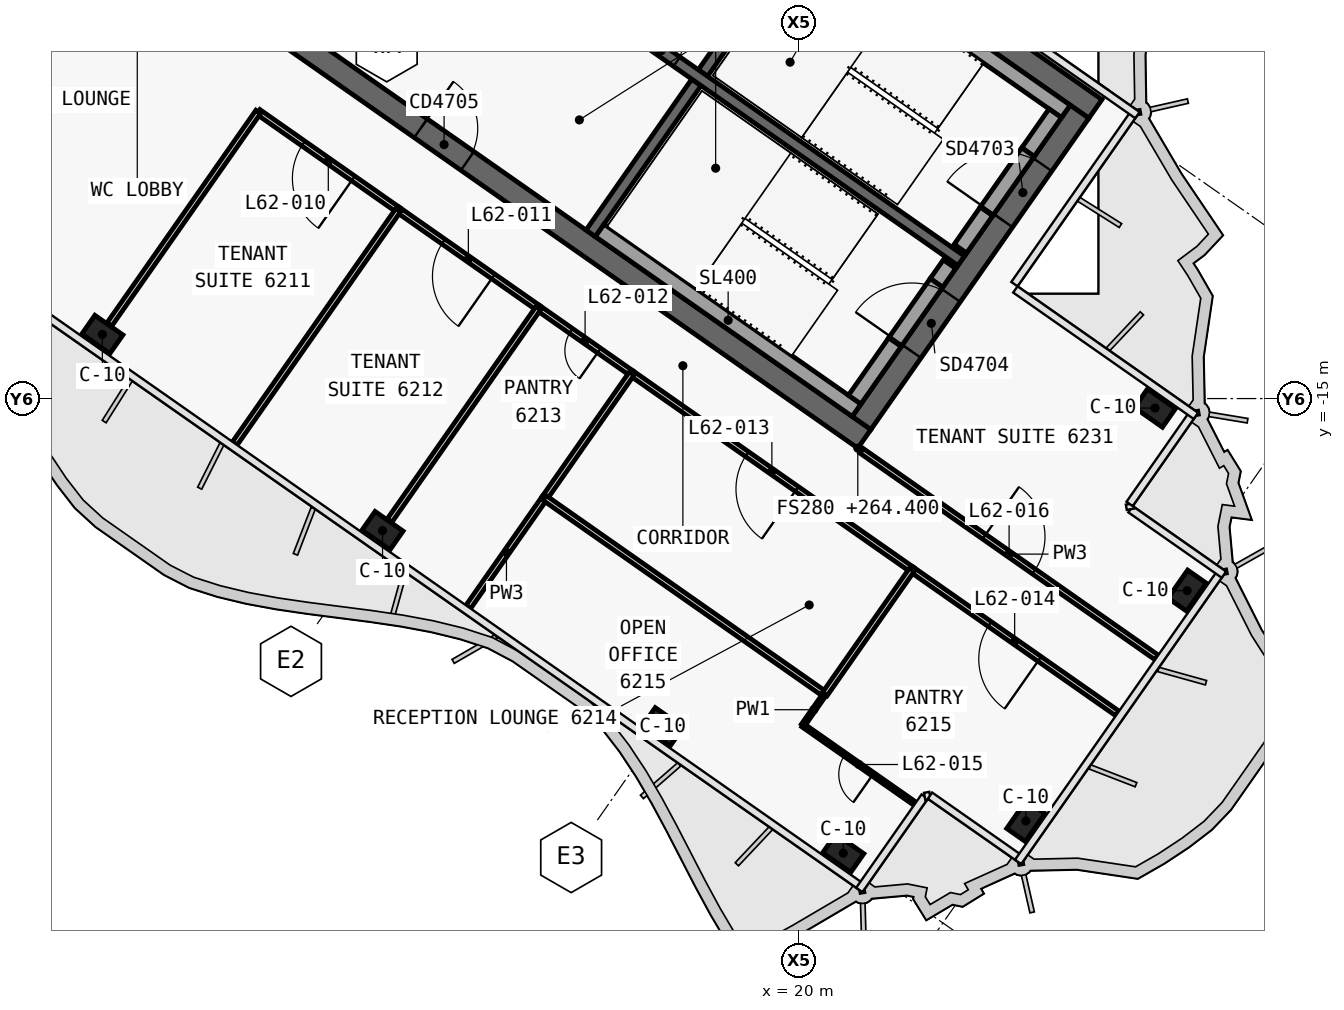
"""IFC4 building model, lengths in metres.
Left out: names, types, materials, properties, quantities, classifications, styles, units other than length and angle.
Written with IfcOpenShell. Run it as: python <this file> out.ifc"""

import sys

from ifc_helpers import new_model, si_unit, direction, frame, frame_2d, origin, origin_2d, place, context, subcontext, project, spatial, polyline, rectangle, outline, extrude, element, fill, save


model = new_model("IFC4")
c1 = context("Model", 3, precision=1e-05, world=origin(), true_north=direction((0.0, 1.0)))
c2 = subcontext(c1, "Body", "Model", "MODEL_VIEW")
j1 = project(units=[si_unit("LENGTHUNIT", "METRE"), si_unit("PLANEANGLEUNIT", "RADIAN")], contexts=[c1])
p1 = place(None, origin())
s1 = spatial("IfcSite", under=j1, at=p1, CompositionType="ELEMENT")
p2 = place(p1, origin())
s2 = spatial("IfcBuilding", under=s1, at=p2, CompositionType="ELEMENT")
p3 = place(p2, frame((0.0, 0.0, 264.4)))
s3 = spatial("IfcBuildingStorey", under=s2, at=p3, CompositionType="ELEMENT", Elevation=264.4)
p4 = place(p3, frame((0.028, 12.066, 0.0), z_axis=(0.0, 0.0, 1.0), x_axis=(0.819151382952, -0.573577380837, 0.0)))
e1 = element("IfcWall", 1, at=p4, inside=s3, PredefinedType="SHEAR", context=c2, shape_type="SweptSolid", body=[
    extrude(outline(polyline([(33.898, 0.3), (0.0, 0.3), (0.42, -0.3), (33.898, -0.3), (33.898, 0.3)])), origin(), (0.0, 0.0, 1.0), 3.9),
])
p5 = place(p3, frame((0.028, -0.874, 0.0), z_axis=(0.0, 0.0, 1.0), x_axis=(0.819150035022, -0.573579305871, 0.0)))
e2 = element("IfcWall", 2, at=p5, inside=s3, PredefinedType="SHEAR", context=c2, shape_type="SweptSolid", body=[
    extrude(outline(polyline([(26.476, 0.3), (0.0, 0.3), (0.42, -0.3), (26.476, -0.3), (26.476, 0.3)])), origin(), (0.0, 0.0, 1.0), 3.9),
])
p6 = place(p5, frame((6.576, 0.0, 0.0)))
e3 = element("IfcOpeningElement", 3, at=p6, cuts=e2, PredefinedType="OPENING", context=c2, shape_type="SweptSolid", body=[
    extrude(rectangle(XDim=1.5, YDim=2.1, at=frame_2d((0.75, 1.05))), frame((0.0, 0.31, 0.0), z_axis=(0.0, -1.0, 0.0), x_axis=(1.0, 0.0, 0.0)), (0.0, 0.0, 1.0), 0.62),
])
p7 = place(p5, frame((12.226, 0.0, 0.0)))
e4 = element("IfcOpeningElement", 4, at=p7, cuts=e2, PredefinedType="OPENING", context=c2, shape_type="SweptSolid", body=[
    extrude(rectangle(XDim=1.5, YDim=2.1, at=frame_2d((0.75, 1.05))), frame((0.0, 0.31, 0.0), z_axis=(0.0, -1.0, 0.0), x_axis=(1.0, 0.0, 0.0)), (0.0, 0.0, 1.0), 0.62),
])
p8 = place(p3, frame((21.642, -15.642, 0.0), z_axis=(0.0, 0.0, 1.0), x_axis=(0.573586866468, 0.819144740944, 0.0)))
e5 = element("IfcWall", 5, at=p8, inside=s3, PredefinedType="SHEAR", context=c2, shape_type="SweptSolid", body=[
    extrude(outline(polyline([(10.0, 0.3), (0.0, 0.3), (0.0, -0.3), (10.0, -0.3), (10.0, 0.3)])), origin(), (0.0, 0.0, 1.0), 3.9),
])
p9 = place(p8, frame((6.5, 0.0, 0.0)))
e6 = element("IfcOpeningElement", 6, at=p9, cuts=e5, PredefinedType="OPENING", context=c2, shape_type="SweptSolid", body=[
    extrude(rectangle(XDim=1.8, YDim=2.1, at=frame_2d((0.9, 1.05))), frame((0.0, 0.31, 0.0), z_axis=(0.0, -1.0, 0.0), x_axis=(1.0, 0.0, 0.0)), (0.0, 0.0, 1.0), 0.62),
])
p10 = place(p8, frame((2.3, 0.0, 0.0)))
e7 = element("IfcOpeningElement", 7, at=p10, cuts=e5, PredefinedType="OPENING", context=c2, shape_type="SweptSolid", body=[
    extrude(rectangle(XDim=1.8, YDim=2.1, at=frame_2d((0.9, 1.05))), frame((0.0, 0.31, 0.0), z_axis=(0.0, -1.0, 0.0), x_axis=(1.0, 0.0, 0.0)), (0.0, 0.0, 1.0), 0.62),
])
p11 = place(p3, frame((14.515, -10.652, 0.0), z_axis=(0.0, 0.0, 1.0), x_axis=(0.573560315113, 0.819163332265, 0.0)))
e8 = element("IfcWall", 8, at=p11, inside=s3, PredefinedType="SHEAR", context=c2, shape_type="SweptSolid", body=[
    extrude(outline(polyline([(0.0, 0.15), (0.0, -0.15), (4.85, -0.15), (4.85, 0.15), (0.0, 0.15)])), origin(), (0.0, 0.0, 1.0), 3.9),
])
p12 = place(p3, frame((17.469, -6.433, 0.0), z_axis=(0.0, 0.0, 1.0), x_axis=(0.573594092424, 0.81913968109, 0.0)))
e9 = element("IfcWall", 9, at=p12, inside=s3, PredefinedType="SHEAR", context=c2, shape_type="SweptSolid", body=[
    extrude(outline(polyline([(4.85, -0.15), (4.85, 0.15), (0.0, 0.15), (0.0, -0.15), (4.85, -0.15)])), origin(), (0.0, 0.0, 1.0), 3.9),
])
p13 = place(p3, frame((2.638, 3.768, 0.0), z_axis=(0.0, 0.0, 1.0), x_axis=(0.819155014212, -0.573572194837, 0.0)))
e10 = element("IfcWall", 10, at=p13, inside=s3, PredefinedType="SHEAR", context=c2, shape_type="SweptSolid", body=[
    extrude(outline(polyline([(0.0, 0.15), (0.0, -0.15), (26.4, -0.15), (26.4, 0.15), (0.0, 0.15)])), origin(), (0.0, 0.0, 1.0), 3.9),
])
p14 = place(p13, frame((9.637, 0.0, 0.0)))
e11 = element("IfcOpeningElement", 11, at=p14, cuts=e10, PredefinedType="OPENING", context=c2, shape_type="SweptSolid", body=[
    extrude(rectangle(XDim=1.2, YDim=2.1, at=frame_2d((0.6, 1.05))), frame((0.0, 0.16, 0.0), z_axis=(0.0, -1.0, 0.0), x_axis=(1.0, 0.0, 0.0)), (0.0, 0.0, 1.0), 0.32),
])
p15 = place(p13, frame((11.812, 0.0, 0.0)))
e12 = element("IfcOpeningElement", 12, at=p15, cuts=e10, PredefinedType="OPENING", context=c2, shape_type="SweptSolid", body=[
    extrude(rectangle(XDim=1.2, YDim=2.1, at=frame_2d((0.6, 1.05))), frame((0.0, 0.16, 0.0), z_axis=(0.0, -1.0, 0.0), x_axis=(1.0, 0.0, 0.0)), (0.0, 0.0, 1.0), 0.32),
])
p16 = place(p13, frame((13.988, 0.0, 0.0)))
e13 = element("IfcOpeningElement", 13, at=p16, cuts=e10, PredefinedType="OPENING", context=c2, shape_type="SweptSolid", body=[
    extrude(rectangle(XDim=1.2, YDim=2.1, at=frame_2d((0.6, 1.05))), frame((0.0, 0.16, 0.0), z_axis=(0.0, -1.0, 0.0), x_axis=(1.0, 0.0, 0.0)), (0.0, 0.0, 1.0), 0.32),
])
p17 = place(p13, frame((16.262, 0.0, 0.0)))
e14 = element("IfcOpeningElement", 14, at=p17, cuts=e10, PredefinedType="OPENING", context=c2, shape_type="SweptSolid", body=[
    extrude(rectangle(XDim=1.0, YDim=2.1, at=frame_2d((0.5, 1.05))), frame((0.0, 0.16, 0.0), z_axis=(0.0, -1.0, 0.0), x_axis=(1.0, 0.0, 0.0)), (0.0, 0.0, 1.0), 0.32),
])
for number, where, z_axis, x_axis in (
    (15, (1.665, -13.313, 0.0), (0.0, 0.0, 1.0), (0.819, -0.574, 0.0)),
    (16, (9.038, -18.475, 0.0), (0.0, 0.0, 1.0), (0.819, -0.574, 0.0)),
    (17, (16.41, -23.637, 0.0), (0.0, 0.0, 1.0), (0.819, -0.574, 0.0)),
    (18, (21.161, -26.964, 0.0), (0.0, 0.0, 1.0), (0.819, -0.574, 0.0)),
    (19, (29.363, -15.25, 0.0), (0.0, 0.0, 1.0), (0.819, -0.574, 0.0)),
    (20, (25.966, -26.117, 0.0), (0.0, 0.0, 1.0), (0.574, 0.819, 0.0)),
    (21, (30.21, -20.055, 0.0), (0.0, 0.0, 1.0), (0.574, 0.819, 0.0)),
):
    element("IfcColumn", number, at=place(p3, frame(where, z_axis=z_axis, x_axis=x_axis)), inside=s3, PredefinedType="COLUMN", context=c2, shape_type="SweptSolid", body=[
        extrude(rectangle(XDim=0.9, YDim=0.6, at=origin_2d()), origin(), (0.0, 0.0, 1.0), 3.9),
    ])
p18 = place(p3, frame((20.259, -2.71, 0.0), z_axis=(0.0, 0.0, 1.0), x_axis=(0.81914849389, -0.573581506813, 0.0)))
e22 = element("IfcWall", 22, at=p18, inside=s3, PredefinedType="SOLIDWALL", context=c2, shape_type="SweptSolid", body=[
    extrude(rectangle(XDim=8.25, YDim=0.4, at=frame_2d((4.125, 0.0))), origin(), (0.0, 0.0, 1.0), 3.62),
])
p19 = place(p3, frame((24.244, -11.055, 0.0), z_axis=(0.0, 0.0, 1.0), x_axis=(0.573571582932, 0.819155442668, 0.0)))
e23 = element("IfcWall", 23, at=p19, inside=s3, PredefinedType="SOLIDWALL", context=c2, shape_type="SweptSolid", body=[
    extrude(rectangle(XDim=1.2, YDim=0.4, at=frame_2d((0.6, 0.0))), origin(), (0.0, 0.0, 1.0), 3.62),
])
p20 = place(p3, frame((26.022, -8.515, 0.0), z_axis=(0.0, 0.0, 1.0), x_axis=(0.573619628835, 0.819121798889, 0.0)))
e24 = element("IfcWall", 24, at=p20, inside=s3, PredefinedType="SOLIDWALL", context=c2, shape_type="SweptSolid", body=[
    extrude(rectangle(XDim=1.25, YDim=0.4, at=frame_2d((0.625, 0.0))), origin(), (0.0, 0.0, 1.0), 3.62),
])
p21 = place(p3, frame((24.932, -10.072, 2.15), z_axis=(0.0, 0.0, 1.0), x_axis=(0.573591692345, 0.819141361715, 0.0)))
e25 = element("IfcWall", 25, at=p21, inside=s3, PredefinedType="SOLIDWALL", context=c2, shape_type="SweptSolid", body=[
    extrude(rectangle(XDim=1.9, YDim=0.4, at=frame_2d((0.95, 0.0))), origin(), (0.0, 0.0, 1.0), 1.47),
])
p22 = place(p3, frame((14.753, -10.574, 0.0), z_axis=(0.0, 0.0, 1.0), x_axis=(0.819158229677, -0.573567602601, 0.0)))
e26 = element("IfcWall", 26, at=p22, inside=s3, PredefinedType="SOLIDWALL", context=c2, shape_type="SweptSolid", body=[
    extrude(rectangle(XDim=8.25, YDim=0.4, at=frame_2d((4.125, 0.0))), origin(), (0.0, 0.0, 1.0), 3.62),
])
p23 = place(p3, frame((21.462, -15.028, 0.0), z_axis=(0.0, 0.0, 1.0), x_axis=(0.573559770908, 0.819163713305, 0.0)))
e27 = element("IfcWall", 27, at=p23, inside=s3, PredefinedType="SOLIDWALL", context=c2, shape_type="SweptSolid", body=[
    extrude(rectangle(XDim=1.85, YDim=0.4, at=frame_2d((0.925, 0.0))), origin(), (0.0, 0.0, 1.0), 3.62),
])
p24 = place(p3, frame((23.613, -11.956, 0.0), z_axis=(0.0, 0.0, 1.0), x_axis=(0.573435029941, 0.819251039936, 0.0)))
e28 = element("IfcWall", 28, at=p24, inside=s3, PredefinedType="SOLIDWALL", context=c2, shape_type="SweptSolid", body=[
    extrude(rectangle(XDim=0.6, YDim=0.4, at=frame_2d((0.3, 0.0))), origin(), (0.0, 0.0, 1.0), 3.62),
])
p25 = place(p3, frame((22.523, -13.512, 2.15), z_axis=(0.0, 0.0, 1.0), x_axis=(0.573591692345, 0.819141361715, 0.0)))
e29 = element("IfcWall", 29, at=p25, inside=s3, PredefinedType="SOLIDWALL", context=c2, shape_type="SweptSolid", body=[
    extrude(rectangle(XDim=1.9, YDim=0.4, at=frame_2d((0.95, 0.0))), origin(), (0.0, 0.0, 1.0), 1.47),
])
p26 = place(p3, frame((21.642, -16.375, 0.0), z_axis=(0.0, 0.0, 1.0), x_axis=(0.819154480923, -0.573572956461, 0.0)))
e30 = element("IfcWall", 30, at=p26, inside=s3, PredefinedType="PARTITIONING", context=c2, shape_type="SweptSolid", body=[
    extrude(rectangle(XDim=9.48, YDim=0.15, at=frame_2d((4.74, 0.0))), origin(), (0.0, 0.0, 1.0), 3.0),
])
p27 = place(p26, frame((3.94, 0.0, 0.0)))
e31 = element("IfcOpeningElement", 31, at=p27, cuts=e30, PredefinedType="OPENING", context=c2, shape_type="SweptSolid", body=[
    extrude(rectangle(XDim=1.6, YDim=2.1, at=frame_2d((0.8, 1.05))), frame((0.0, 0.085, 0.0), z_axis=(0.0, -1.0, 0.0), x_axis=(1.0, 0.0, 0.0)), (0.0, 0.0, 1.0), 0.17),
])
p28 = place(p3, frame((9.454, -10.038, 0.0), z_axis=(0.0, 0.0, 1.0), x_axis=(-0.819142740634, 0.573589723117, 0.0)))
e32 = element("IfcWall", 32, at=p28, inside=s3, PredefinedType="PARTITIONING", context=c2, shape_type="SweptSolid", body=[
    extrude(rectangle(XDim=4.502, YDim=0.15, at=frame_2d((2.251, 0.0))), origin(), (0.0, 0.0, 1.0), 3.05),
])
p29 = place(p28, frame((1.451, 0.0, 0.0)))
e33 = element("IfcOpeningElement", 33, at=p29, cuts=e32, PredefinedType="OPENING", context=c2, shape_type="SweptSolid", body=[
    extrude(rectangle(XDim=1.6, YDim=2.1, at=frame_2d((0.8, 1.05))), frame((0.0, 0.085, 0.0), z_axis=(0.0, -1.0, 0.0), x_axis=(1.0, 0.0, 0.0)), (0.0, 0.0, 1.0), 0.17),
])
p30 = place(p3, frame((13.14, -12.619, 0.0), z_axis=(0.0, 0.0, 1.0), x_axis=(-0.819165703328, 0.573556928727, 0.0)))
e34 = element("IfcWall", 34, at=p30, inside=s3, PredefinedType="PARTITIONING", context=c2, shape_type="SweptSolid", body=[
    extrude(rectangle(XDim=4.504, YDim=0.15, at=frame_2d((2.252, 0.0))), origin(), (0.0, 0.0, 1.0), 3.05),
])
p31 = place(p30, frame((1.452, 0.0, 0.0)))
e35 = element("IfcOpeningElement", 35, at=p31, cuts=e34, PredefinedType="OPENING", context=c2, shape_type="SweptSolid", body=[
    extrude(rectangle(XDim=1.6, YDim=2.1, at=frame_2d((0.8, 1.05))), frame((0.0, 0.085, 0.0), z_axis=(0.0, -1.0, 0.0), x_axis=(1.0, 0.0, 0.0)), (0.0, 0.0, 1.0), 0.17),
])
p32 = place(p3, frame((15.598, -14.34, 0.0), z_axis=(0.0, 0.0, 1.0), x_axis=(-0.81916700466, 0.573555070134, 0.0)))
e36 = element("IfcWall", 36, at=p32, inside=s3, PredefinedType="PARTITIONING", context=c2, shape_type="SweptSolid", body=[
    extrude(rectangle(XDim=3.004, YDim=0.15, at=frame_2d((1.502, 0.0))), origin(), (0.0, 0.0, 1.0), 3.05),
])
p33 = place(p32, frame((1.052, 0.0, 0.0)))
e37 = element("IfcOpeningElement", 37, at=p33, cuts=e36, PredefinedType="OPENING", context=c2, shape_type="SweptSolid", body=[
    extrude(rectangle(XDim=0.9, YDim=2.1, at=frame_2d((0.45, 1.05))), frame((0.0, 0.085, 0.0), z_axis=(0.0, -1.0, 0.0), x_axis=(1.0, 0.0, 0.0)), (0.0, 0.0, 1.0), 0.17),
])
p34 = place(p3, frame((22.97, -19.502, 0.0), z_axis=(0.0, 0.0, 1.0), x_axis=(-0.819151661297, 0.57357698332, 0.0)))
e38 = element("IfcWall", 38, at=p34, inside=s3, PredefinedType="PARTITIONING", context=c2, shape_type="SweptSolid", body=[
    extrude(rectangle(XDim=9.004, YDim=0.15, at=frame_2d((4.502, 0.0))), origin(), (0.0, 0.0, 1.0), 3.05),
])
p35 = place(p34, frame((3.702, 0.0, 0.0)))
e39 = element("IfcOpeningElement", 39, at=p35, cuts=e38, PredefinedType="OPENING", context=c2, shape_type="SweptSolid", body=[
    extrude(rectangle(XDim=1.6, YDim=2.1, at=frame_2d((0.8, 1.05))), frame((0.0, 0.085, 0.0), z_axis=(0.0, -1.0, 0.0), x_axis=(1.0, 0.0, 0.0)), (0.0, 0.0, 1.0), 0.17),
])
p36 = place(p3, frame((28.375, -23.287, 0.0), z_axis=(0.0, 0.0, 1.0), x_axis=(-0.81915199888, 0.573576501202, 0.0)))
e40 = element("IfcWall", 40, at=p36, inside=s3, PredefinedType="PARTITIONING", context=c2, shape_type="SweptSolid", body=[
    extrude(rectangle(XDim=6.602, YDim=0.15, at=frame_2d((3.301, 0.0))), origin(), (0.0, 0.0, 1.0), 3.0),
])
p37 = place(p36, frame((2.501, 0.0, 0.0)))
e41 = element("IfcOpeningElement", 41, at=p37, cuts=e40, PredefinedType="OPENING", context=c2, shape_type="SweptSolid", body=[
    extrude(rectangle(XDim=1.6, YDim=2.1, at=frame_2d((0.8, 1.05))), frame((0.0, 0.085, 0.0), z_axis=(0.0, -1.0, 0.0), x_axis=(1.0, 0.0, 0.0)), (0.0, 0.0, 1.0), 0.17),
])
p38 = place(p3, frame((9.452, -10.037, 0.0), z_axis=(0.0, 0.0, 1.0), x_axis=(-0.573575945067, -0.81915238829, 0.0)))
e42 = element("IfcWall", 42, at=p38, inside=s3, PredefinedType="PARTITIONING", context=c2, shape_type="SweptSolid", body=[
    extrude(rectangle(XDim=7.5, YDim=0.15, at=frame_2d((3.75, 0.0))), origin(), (0.0, 0.0, 1.0), 3.0),
])
p39 = place(p3, frame((1.849, -13.051, 0.0), z_axis=(0.0, 0.0, 1.0), x_axis=(0.573577493031, 0.819151304393, 0.0)))
e43 = element("IfcWall", 43, at=p39, inside=s3, PredefinedType="PARTITIONING", context=c2, shape_type="SweptSolid", body=[
    extrude(rectangle(XDim=6.83, YDim=0.15, at=frame_2d((3.415, 0.0))), origin(), (0.0, 0.0, 1.0), 3.05),
])
p40 = place(p3, frame((13.139, -12.618, 0.0), z_axis=(0.0, 0.0, 1.0), x_axis=(-0.573560698343, -0.819163063936, 0.0)))
e44 = element("IfcWall", 44, at=p40, inside=s3, PredefinedType="PARTITIONING", context=c2, shape_type="SweptSolid", body=[
    extrude(rectangle(XDim=6.83, YDim=0.15, at=frame_2d((3.415, 0.0))), origin(), (0.0, 0.0, 1.0), 3.05),
])
p41 = place(p3, frame((15.596, -14.339, 0.0), z_axis=(0.0, 0.0, 1.0), x_axis=(-0.573560601885, -0.819163131473, 0.0)))
e45 = element("IfcWall", 45, at=p41, inside=s3, PredefinedType="PARTITIONING", context=c2, shape_type="SweptSolid", body=[
    extrude(rectangle(XDim=4.002, YDim=0.15, at=frame_2d((2.001, 0.0))), origin(), (0.0, 0.0, 1.0), 3.62),
])
p42 = place(p3, frame((13.302, -17.615, 0.0), z_axis=(0.0, 0.0, 1.0), x_axis=(-0.573560622794, -0.819163116834, 0.0)))
e46 = element("IfcWall", 46, at=p42, inside=s3, PredefinedType="PARTITIONING", context=c2, shape_type="SweptSolid", body=[
    extrude(rectangle(XDim=3.501, YDim=0.15, at=frame_2d((1.75, 0.0))), origin(), (0.0, 0.0, 1.0), 3.0),
])
p43 = place(p3, frame((20.674, -22.778, 0.0), z_axis=(0.0, 0.0, 1.0), x_axis=(-0.819141427692, 0.573591598124, 0.0)))
e47 = element("IfcWall", 47, at=p43, inside=s3, PredefinedType="PARTITIONING", context=c2, shape_type="SweptSolid", body=[
    extrude(rectangle(XDim=9.0, YDim=0.15, at=frame_2d((4.5, 0.0))), origin(), (0.0, 0.0, 1.0), 3.05),
])
p44 = place(p3, frame((22.969, -19.501, 0.0), z_axis=(0.0, 0.0, 1.0), x_axis=(-0.573556557423, -0.819165963305, 0.0)))
e48 = element("IfcWall", 48, at=p44, inside=s3, PredefinedType="PARTITIONING", context=c2, shape_type="SweptSolid", body=[
    extrude(rectangle(XDim=4.0, YDim=0.15, at=frame_2d((2.0, 0.0))), origin(), (0.0, 0.0, 1.0), 3.05),
])
p45 = place(p3, frame((20.1, -23.597, 0.0), z_axis=(0.0, 0.0, 1.0), x_axis=(0.573544276158, 0.819174562158, 0.0)))
e49 = element("IfcWall", 49, at=p45, inside=s3, PredefinedType="PARTITIONING", context=c2, shape_type="SweptSolid", body=[
    extrude(rectangle(XDim=1.0, YDim=0.1, at=frame_2d((0.5, 0.0))), origin(), (0.0, 0.0, 1.0), 3.62),
])
p46 = place(p3, frame((23.049, -25.662, 0.0), z_axis=(0.0, 0.0, 1.0), x_axis=(-0.81914589004, 0.573585225429, 0.0)))
e50 = element("IfcWall", 50, at=p46, inside=s3, PredefinedType="PARTITIONING", context=c2, shape_type="SweptSolid", body=[
    extrude(rectangle(XDim=3.6, YDim=0.1, at=frame_2d((1.8, 0.0))), origin(), (0.0, 0.0, 1.0), 3.05),
])
p47 = place(p46, frame((1.35, 0.0, 0.0)))
e51 = element("IfcOpeningElement", 51, at=p47, cuts=e50, PredefinedType="OPENING", context=c2, shape_type="SweptSolid", body=[
    extrude(rectangle(XDim=0.9, YDim=2.1, at=frame_2d((0.45, 1.05))), frame((0.0, 0.06, 0.0), z_axis=(0.0, -1.0, 0.0), x_axis=(1.0, 0.0, 0.0)), (0.0, 0.0, 1.0), 0.12),
])
p48 = place(p17, origin())
e52 = element("IfcDoor", 52, at=p48, inside=s3, OperationType="SINGLE_SWING_RIGHT", PredefinedType="DOOR", context=c2, shape_type="SweptSolid", body=[
    extrude(rectangle(XDim=1.0, YDim=2.1, at=frame_2d((0.5, 1.05))), frame((0.0, 0.025, 0.0), z_axis=(0.0, -1.0, 0.0), x_axis=(1.0, 0.0, 0.0)), (0.0, 0.0, 1.0), 0.05),
])
fill(e14, e52)
p49 = place(p7, origin())
e53 = element("IfcDoor", 53, at=p49, inside=s3, OperationType="DOUBLE_DOOR_SINGLE_SWING", PredefinedType="DOOR", context=c2, shape_type="SweptSolid", body=[
    extrude(rectangle(XDim=1.5, YDim=2.1, at=frame_2d((0.75, 1.05))), frame((0.0, 0.025, 0.0), z_axis=(0.0, -1.0, 0.0), x_axis=(1.0, 0.0, 0.0)), (0.0, 0.0, 1.0), 0.05),
])
fill(e4, e53)
p50 = place(p9, origin())
e54 = element("IfcDoor", 54, at=p50, inside=s3, OperationType="DOUBLE_DOOR_SINGLE_SWING", PredefinedType="DOOR", context=c2, shape_type="SweptSolid", body=[
    extrude(rectangle(XDim=1.8, YDim=2.1, at=frame_2d((0.9, 1.05))), frame((0.0, 0.025, 0.0), z_axis=(0.0, -1.0, 0.0), x_axis=(1.0, 0.0, 0.0)), (0.0, 0.0, 1.0), 0.05),
])
fill(e6, e54)
p51 = place(p10, origin())
e55 = element("IfcDoor", 55, at=p51, inside=s3, OperationType="DOUBLE_DOOR_SINGLE_SWING", PredefinedType="DOOR", context=c2, shape_type="SweptSolid", body=[
    extrude(rectangle(XDim=1.8, YDim=2.1, at=frame_2d((0.9, 1.05))), frame((0.0, 0.025, 0.0), z_axis=(0.0, -1.0, 0.0), x_axis=(1.0, 0.0, 0.0)), (0.0, 0.0, 1.0), 0.05),
])
fill(e7, e55)
p52 = place(p29, origin())
e56 = element("IfcDoor", 56, at=p52, inside=s3, OperationType="DOUBLE_DOOR_SINGLE_SWING", PredefinedType="DOOR", context=c2, shape_type="SweptSolid", body=[
    extrude(rectangle(XDim=1.6, YDim=2.1, at=frame_2d((0.8, 1.05))), frame((0.0, 0.025, 0.0), z_axis=(0.0, -1.0, 0.0), x_axis=(1.0, 0.0, 0.0)), (0.0, 0.0, 1.0), 0.05),
])
fill(e33, e56)
p53 = place(p31, origin())
e57 = element("IfcDoor", 57, at=p53, inside=s3, OperationType="DOUBLE_DOOR_SINGLE_SWING", PredefinedType="DOOR", context=c2, shape_type="SweptSolid", body=[
    extrude(rectangle(XDim=1.6, YDim=2.1, at=frame_2d((0.8, 1.05))), frame((0.0, 0.025, 0.0), z_axis=(0.0, -1.0, 0.0), x_axis=(1.0, 0.0, 0.0)), (0.0, 0.0, 1.0), 0.05),
])
fill(e35, e57)
p54 = place(p33, origin())
e58 = element("IfcDoor", 58, at=p54, inside=s3, OperationType="SINGLE_SWING_LEFT", PredefinedType="DOOR", context=c2, shape_type="SweptSolid", body=[
    extrude(rectangle(XDim=0.9, YDim=2.1, at=frame_2d((0.45, 1.05))), frame((0.0, 0.025, 0.0), z_axis=(0.0, -1.0, 0.0), x_axis=(1.0, 0.0, 0.0)), (0.0, 0.0, 1.0), 0.05),
])
fill(e37, e58)
p55 = place(p35, origin())
e59 = element("IfcDoor", 59, at=p55, inside=s3, OperationType="DOUBLE_DOOR_SINGLE_SWING", PredefinedType="DOOR", context=c2, shape_type="SweptSolid", body=[
    extrude(rectangle(XDim=1.6, YDim=2.1, at=frame_2d((0.8, 1.05))), frame((0.0, 0.025, 0.0), z_axis=(0.0, -1.0, 0.0), x_axis=(1.0, 0.0, 0.0)), (0.0, 0.0, 1.0), 0.05),
])
fill(e39, e59)
p56 = place(p37, origin())
e60 = element("IfcDoor", 60, at=p56, inside=s3, OperationType="DOUBLE_DOOR_SINGLE_SWING", PredefinedType="DOOR", context=c2, shape_type="SweptSolid", body=[
    extrude(rectangle(XDim=1.6, YDim=2.1, at=frame_2d((0.8, 1.05))), frame((0.0, 0.025, 0.0), z_axis=(0.0, -1.0, 0.0), x_axis=(1.0, 0.0, 0.0)), (0.0, 0.0, 1.0), 0.05),
])
fill(e41, e60)
p57 = place(p47, origin())
e61 = element("IfcDoor", 61, at=p57, inside=s3, OperationType="SINGLE_SWING_LEFT", PredefinedType="DOOR", context=c2, shape_type="SweptSolid", body=[
    extrude(rectangle(XDim=0.9, YDim=2.1, at=frame_2d((0.45, 1.05))), frame((0.0, 0.025, 0.0), z_axis=(0.0, -1.0, 0.0), x_axis=(1.0, 0.0, 0.0)), (0.0, 0.0, 1.0), 0.05),
])
fill(e51, e61)
p58 = place(p27, origin())
e62 = element("IfcDoor", 62, at=p58, inside=s3, OperationType="DOUBLE_DOOR_SINGLE_SWING", PredefinedType="DOOR", context=c2, shape_type="SweptSolid", body=[
    extrude(rectangle(XDim=1.6, YDim=2.1, at=frame_2d((0.8, 1.05))), frame((0.0, 0.025, 0.0), z_axis=(0.0, -1.0, 0.0), x_axis=(1.0, 0.0, 0.0)), (0.0, 0.0, 1.0), 0.05),
])
fill(e31, e62)
save(model, sys.argv[1])
